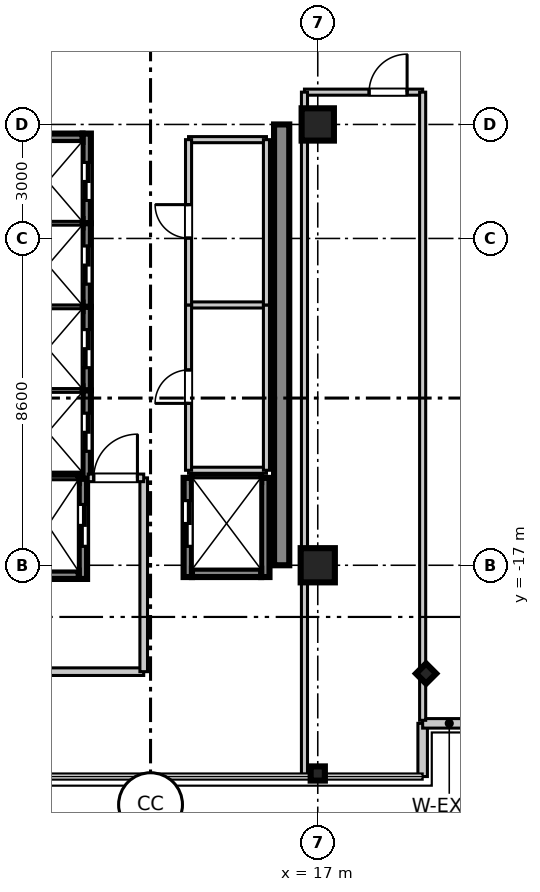
"""IFC4 building model, lengths in metres.
Left out: names, types, materials, properties, quantities, classifications, styles, units other than length and angle.
Written with IfcOpenShell. Run it as: python <this file> out.ifc"""

import sys

from ifc_helpers import new_model, si_unit, direction, frame, frame_2d, origin, origin_2d, place, context, subcontext, project, spatial, rectangle, i_section, extrude, source, transform, mapped, element, fill, save


model = new_model("IFC4")
c1 = context("Model", 3, precision=1e-05, world=origin(), true_north=direction((0.0, 1.0)))
c2 = subcontext(c1, "Body", "Model", "MODEL_VIEW")
j1 = project(units=[si_unit("LENGTHUNIT", "METRE"), si_unit("PLANEANGLEUNIT", "RADIAN")], contexts=[c1])
p1 = place(None, origin())
s1 = spatial("IfcSite", under=j1, at=p1, CompositionType="ELEMENT")
p2 = place(p1, origin())
s2 = spatial("IfcBuilding", under=s1, at=p2, CompositionType="ELEMENT")
p3 = place(p2, frame((0.0, 0.0, 334.75)))
s3 = spatial("IfcBuildingStorey", under=s2, at=p3, CompositionType="ELEMENT", Elevation=334.75)
m1 = source(origin(), c2, "Body", "SweptSolid", [
    extrude(rectangle(XDim=0.9, YDim=0.9, at=origin_2d()), origin(), (0.0, 0.0, 1.0), 3.755),
])
p4 = place(p3, frame((17.0, -17.0, 0.0), z_axis=(0.0, 0.0, 1.0), x_axis=(1.0, 0.0, 0.0)))
e1 = element("IfcColumn", 1, at=p4, inside=s3, PredefinedType="COLUMN", context=c2, shape_type="MappedRepresentation", body=[
    mapped(m1, transform((0.0, 0.0, 0.0), scale=1.0)),
])
m2 = source(origin(), c2, "Body", "SweptSolid", [
    extrude(rectangle(XDim=0.85, YDim=0.85, at=origin_2d()), origin(), (0.0, 0.0, 1.0), 3.755),
])
p5 = place(p3, frame((17.0, -5.4, 0.0), z_axis=(0.0, 0.0, 1.0), x_axis=(1.0, 0.0, 0.0)))
e2 = element("IfcColumn", 2, at=p5, inside=s3, PredefinedType="PILASTER", context=c2, shape_type="MappedRepresentation", body=[
    mapped(m2, transform((0.0, 0.0, 0.0), scale=1.0)),
])
m3 = source(origin(), c2, "Body", "SweptSolid", [
    extrude(i_section(OverallWidth=0.374, OverallDepth=0.374, WebThickness=0.014, FlangeThickness=0.023, at=origin_2d()), origin(), (0.0, 0.0, 1.0), 3.755),
])
for number, where, z_axis, x_axis in (
    (3, (17.0, -22.48, 0.0), (0.0, 0.0, 1.0), (0.0, 1.0, 0.0)),
    (4, (19.85, -19.85, 0.0), (0.0, 0.0, 1.0), (0.707, 0.707, 0.0)),
):
    element("IfcColumn", number, at=place(p3, frame(where, z_axis=z_axis, x_axis=x_axis)), inside=s3, PredefinedType="COLUMN", context=c2, shape_type="MappedRepresentation", body=[
        mapped(m3, transform((0.0, 0.0, 0.0), scale=1.0)),
    ])
m4 = source(origin(), c2, "Body", "SweptSolid", [
    extrude(rectangle(XDim=11.6, YDim=0.4, at=frame_2d((5.8, 0.0))), origin(), (0.0, 0.0, 1.0), 3.47),
])
p6 = place(p3, frame((16.05, -17.0, 0.0), z_axis=(0.0, 0.0, 1.0), x_axis=(0.0, 1.0, 0.0)))
e5 = element("IfcWall", 5, at=p6, inside=s3, PredefinedType="SHEAR", context=c2, shape_type="MappedRepresentation", body=[
    mapped(m4, transform((0.0, 0.0, 0.0), scale=1.0)),
])
m5 = source(origin(), c2, "Body", "SweptSolid", [
    extrude(rectangle(XDim=2.36, YDim=0.22, at=frame_2d((1.18, 0.0))), origin(), (0.0, 0.0, 1.0), 3.47),
])
p7 = place(p3, frame((10.92, -8.0, 0.0), z_axis=(0.0, 0.0, 1.0), x_axis=(0.0, 1.0, 0.0)))
e6 = element("IfcWall", 6, at=p7, inside=s3, PredefinedType="SHEAR", context=c2, shape_type="MappedRepresentation", body=[
    mapped(m5, transform((0.0, 0.0, 0.0), scale=1.0)),
])
p8 = place(p7, frame((0.6, 0.0, 0.0)))
e7 = element("IfcOpeningElement", 7, at=p8, cuts=e6, PredefinedType="OPENING", context=c2, shape_type="SweptSolid", body=[
    extrude(rectangle(XDim=1.0, YDim=2.2, at=frame_2d((0.5, 1.1))), frame((0.0, 0.12, 0.0), z_axis=(0.0, -1.0, 0.0), x_axis=(1.0, 0.0, 0.0)), (0.0, 0.0, 1.0), 0.24),
])
m6 = source(origin(), c2, "Body", "SweptSolid", [
    extrude(rectangle(XDim=1.82, YDim=0.22, at=frame_2d((0.91, 0.0))), origin(), (0.0, 0.0, 1.0), 3.47),
])
p9 = place(p3, frame((8.99, -5.75, 0.0), z_axis=(0.0, 0.0, 1.0), x_axis=(1.0, 0.0, 0.0)))
e8 = element("IfcWall", 8, at=p9, inside=s3, PredefinedType="SHEAR", context=c2, shape_type="MappedRepresentation", body=[
    mapped(m6, transform((0.0, 0.0, 0.0), scale=1.0)),
])
m7 = source(origin(), c2, "Body", "SweptSolid", [
    extrude(rectangle(XDim=2.2, YDim=0.22, at=frame_2d((1.1, 0.0))), origin(), (0.0, 0.0, 1.0), 3.47),
])
p10 = place(p3, frame((10.92, -10.2, 0.0), z_axis=(0.0, 0.0, 1.0), x_axis=(0.0, 1.0, 0.0)))
e9 = element("IfcWall", 9, at=p10, inside=s3, PredefinedType="SHEAR", context=c2, shape_type="MappedRepresentation", body=[
    mapped(m7, transform((0.0, 0.0, 0.0), scale=1.0)),
])
p11 = place(p10, frame((0.6, 0.0, 0.0)))
e10 = element("IfcOpeningElement", 10, at=p11, cuts=e9, PredefinedType="OPENING", context=c2, shape_type="SweptSolid", body=[
    extrude(rectangle(XDim=1.0, YDim=2.2, at=frame_2d((0.5, 1.1))), frame((0.0, 0.12, 0.0), z_axis=(0.0, -1.0, 0.0), x_axis=(1.0, 0.0, 0.0)), (0.0, 0.0, 1.0), 0.24),
])
m8 = source(origin(), c2, "Body", "SweptSolid", [
    extrude(rectangle(XDim=1.82, YDim=0.22, at=frame_2d((0.91, 0.0))), origin(), (0.0, 0.0, 1.0), 3.8),
])
p12 = place(p3, frame((8.99, -8.0, 0.0), z_axis=(0.0, 0.0, 1.0), x_axis=(1.0, 0.0, 0.0)))
e11 = element("IfcWall", 11, at=p12, inside=s3, PredefinedType="SHEAR", context=c2, shape_type="MappedRepresentation", body=[
    mapped(m8, transform((0.0, 0.0, 0.0), scale=1.0)),
])
p13 = place(p3, frame((10.92, -12.4, 0.0), z_axis=(0.0, 0.0, 1.0), x_axis=(0.0, 1.0, 0.0)))
e12 = element("IfcWall", 12, at=p13, inside=s3, PredefinedType="SHEAR", context=c2, shape_type="MappedRepresentation", body=[
    mapped(m7, transform((0.0, 0.0, 0.0), scale=1.0)),
])
p14 = place(p13, frame((0.6, 0.0, 0.0)))
e13 = element("IfcOpeningElement", 13, at=p14, cuts=e12, PredefinedType="OPENING", context=c2, shape_type="SweptSolid", body=[
    extrude(rectangle(XDim=1.0, YDim=2.2, at=frame_2d((0.5, 1.1))), frame((0.0, 0.12, 0.0), z_axis=(0.0, -1.0, 0.0), x_axis=(1.0, 0.0, 0.0)), (0.0, 0.0, 1.0), 0.24),
])
p15 = place(p3, frame((8.99, -10.2, 0.0), z_axis=(0.0, 0.0, 1.0), x_axis=(1.0, 0.0, 0.0)))
e14 = element("IfcWall", 14, at=p15, inside=s3, PredefinedType="SHEAR", context=c2, shape_type="MappedRepresentation", body=[
    mapped(m8, transform((0.0, 0.0, 0.0), scale=1.0)),
])
m9 = source(origin(), c2, "Body", "SweptSolid", [
    extrude(rectangle(XDim=2.325, YDim=0.22, at=frame_2d((1.163, 0.0))), origin(), (0.0, 0.0, 1.0), 3.47),
])
p16 = place(p3, frame((10.92, -14.725, 0.0), z_axis=(0.0, 0.0, 1.0), x_axis=(0.0, 1.0, 0.0)))
e15 = element("IfcWall", 15, at=p16, inside=s3, PredefinedType="SHEAR", context=c2, shape_type="MappedRepresentation", body=[
    mapped(m9, transform((0.0, 0.0, 0.0), scale=1.0)),
])
p17 = place(p16, frame((0.725, 0.0, 0.0)))
e16 = element("IfcOpeningElement", 16, at=p17, cuts=e15, PredefinedType="OPENING", context=c2, shape_type="SweptSolid", body=[
    extrude(rectangle(XDim=1.0, YDim=2.2, at=frame_2d((0.5, 1.1))), frame((0.0, 0.12, 0.0), z_axis=(0.0, -1.0, 0.0), x_axis=(1.0, 0.0, 0.0)), (0.0, 0.0, 1.0), 0.24),
])
p18 = place(p3, frame((8.99, -12.4, 0.0), z_axis=(0.0, 0.0, 1.0), x_axis=(1.0, 0.0, 0.0)))
e17 = element("IfcWall", 17, at=p18, inside=s3, PredefinedType="SHEAR", context=c2, shape_type="MappedRepresentation", body=[
    mapped(m8, transform((0.0, 0.0, 0.0), scale=1.0)),
])
m10 = source(origin(), c2, "Body", "SweptSolid", [
    extrude(rectangle(XDim=2.635, YDim=0.22, at=frame_2d((1.317, 0.0))), origin(), (0.0, 0.0, 1.0), 3.47),
])
p19 = place(p3, frame((10.82, -17.36, 0.0), z_axis=(0.0, 0.0, 1.0), x_axis=(0.0, 1.0, 0.0)))
e18 = element("IfcWall", 18, at=p19, inside=s3, PredefinedType="SHEAR", context=c2, shape_type="MappedRepresentation", body=[
    mapped(m10, transform((0.0, 0.0, 0.0), scale=1.0)),
])
p20 = place(p19, frame((0.86, 0.0, 0.0)))
e19 = element("IfcOpeningElement", 19, at=p20, cuts=e18, PredefinedType="OPENING", context=c2, shape_type="SweptSolid", body=[
    extrude(rectangle(XDim=1.1, YDim=2.2, at=frame_2d((0.55, 1.1))), frame((0.0, 0.12, 0.0), z_axis=(0.0, -1.0, 0.0), x_axis=(1.0, 0.0, 0.0)), (0.0, 0.0, 1.0), 0.24),
])
m11 = source(origin(), c2, "Body", "SweptSolid", [
    extrude(rectangle(XDim=1.62, YDim=0.22, at=frame_2d((0.81, 0.0))), origin(), (0.0, 0.0, 1.0), 3.47),
])
p21 = place(p3, frame((9.09, -17.25, 0.0), z_axis=(0.0, 0.0, 1.0), x_axis=(1.0, 0.0, 0.0)))
e20 = element("IfcWall", 20, at=p21, inside=s3, PredefinedType="SHEAR", context=c2, shape_type="MappedRepresentation", body=[
    mapped(m11, transform((0.0, 0.0, 0.0), scale=1.0)),
])
m12 = source(origin(), c2, "Body", "SweptSolid", [
    extrude(rectangle(XDim=1.62, YDim=0.22, at=frame_2d((0.81, 0.0))), origin(), (0.0, 0.0, 1.0), 3.8),
])
p22 = place(p3, frame((9.09, -14.725, 0.0), z_axis=(0.0, 0.0, 1.0), x_axis=(1.0, 0.0, 0.0)))
e21 = element("IfcWall", 21, at=p22, inside=s3, PredefinedType="SHEAR", context=c2, shape_type="MappedRepresentation", body=[
    mapped(m12, transform((0.0, 0.0, 0.0), scale=1.0)),
])
m13 = source(origin(), c2, "Body", "SweptSolid", [
    extrude(rectangle(XDim=2.61, YDim=0.22, at=frame_2d((1.305, 0.0))), origin(), (0.0, 0.0, 1.0), 3.47),
])
p23 = place(p3, frame((13.58, -17.31, 0.0), z_axis=(0.0, 0.0, 1.0), x_axis=(0.0, 1.0, 0.0)))
e22 = element("IfcWall", 22, at=p23, inside=s3, PredefinedType="SHEAR", context=c2, shape_type="MappedRepresentation", body=[
    mapped(m13, transform((0.0, 0.0, 0.0), scale=1.0)),
])
p24 = place(p23, frame((0.81, 0.0, 0.0)))
e23 = element("IfcOpeningElement", 23, at=p24, cuts=e22, PredefinedType="OPENING", context=c2, shape_type="SweptSolid", body=[
    extrude(rectangle(XDim=1.2, YDim=2.2, at=frame_2d((0.6, 1.1))), frame((0.0, 0.12, 0.0), z_axis=(0.0, -1.0, 0.0), x_axis=(1.0, 0.0, 0.0)), (0.0, 0.0, 1.0), 0.24),
])
p25 = place(p3, frame((15.62, -17.31, 0.0), z_axis=(0.0, 0.0, 1.0), x_axis=(0.0, 1.0, 0.0)))
e24 = element("IfcWall", 24, at=p25, inside=s3, PredefinedType="SHEAR", context=c2, shape_type="MappedRepresentation", body=[
    mapped(m13, transform((0.0, 0.0, 0.0), scale=1.0)),
])
p26 = place(p3, frame((13.69, -17.2, 0.0), z_axis=(0.0, 0.0, 1.0), x_axis=(1.0, 0.0, 0.0)))
e25 = element("IfcWall", 25, at=p26, inside=s3, PredefinedType="SHEAR", context=c2, shape_type="MappedRepresentation", body=[
    mapped(m6, transform((0.0, 0.0, 0.0), scale=1.0)),
])
p27 = place(p3, frame((13.69, -14.7, 0.0), z_axis=(0.0, 0.0, 1.0), x_axis=(1.0, 0.0, 0.0)))
e26 = element("IfcWall", 26, at=p27, inside=s3, PredefinedType="SHEAR", context=c2, shape_type="MappedRepresentation", body=[
    mapped(m8, transform((0.0, 0.0, 0.0), scale=1.0)),
])
m14 = source(origin(), c2, "Body", "SweptSolid", [
    extrude(rectangle(XDim=1.4, YDim=0.25, at=frame_2d((0.7, 0.0))), origin(), (0.0, 0.0, 1.0), 3.47),
])
p28 = place(p3, frame((19.76, -22.56, 0.0), z_axis=(0.0, 0.0, 1.0), x_axis=(0.0, 1.0, 0.0)))
e27 = element("IfcWall", 27, at=p28, inside=s3, PredefinedType="STANDARD", context=c2, shape_type="MappedRepresentation", body=[
    mapped(m14, transform((0.0, 0.0, 0.0), scale=1.0)),
])
m15 = source(origin(), c2, "Body", "SweptSolid", [
    extrude(rectangle(XDim=1.4, YDim=0.25, at=frame_2d((0.7, 0.0))), origin(), (0.0, 0.0, 1.0), 3.47),
])
p29 = place(p3, frame((19.76, -21.16, 0.0), z_axis=(0.0, 0.0, 1.0), x_axis=(1.0, 0.0, 0.0)))
e28 = element("IfcWall", 28, at=p29, inside=s3, PredefinedType="STANDARD", context=c2, shape_type="MappedRepresentation", body=[
    mapped(m15, transform((0.0, 0.0, 0.0), scale=1.0)),
])
m16 = source(origin(), c2, "Body", "SweptSolid", [
    extrude(rectangle(XDim=5.82, YDim=0.2, at=frame_2d((2.91, 0.0))), origin(), (0.0, 0.0, 1.0), 2.81),
])
p30 = place(p3, frame((6.6, -19.8, 0.0), z_axis=(0.0, 0.0, 1.0), x_axis=(1.0, 0.0, 0.0)))
e29 = element("IfcWall", 29, at=p30, inside=s3, PredefinedType="PARTITIONING", context=c2, shape_type="MappedRepresentation", body=[
    mapped(m16, transform((0.0, 0.0, 0.0), scale=1.0)),
])
m17 = source(origin(), c2, "Body", "SweptSolid", [
    extrude(rectangle(XDim=5.1, YDim=0.2, at=frame_2d((2.55, 0.0))), origin(), (0.0, 0.0, 1.0), 2.81),
])
p31 = place(p3, frame((12.42, -19.8, 0.0), z_axis=(0.0, 0.0, 1.0), x_axis=(0.0, 1.0, 0.0)))
e30 = element("IfcWall", 30, at=p31, inside=s3, PredefinedType="PARTITIONING", context=c2, shape_type="MappedRepresentation", body=[
    mapped(m17, transform((0.0, 0.0, 0.0), scale=1.0)),
])
m18 = source(origin(), c2, "Body", "SweptSolid", [
    extrude(rectangle(XDim=1.46, YDim=0.2, at=frame_2d((0.73, 0.0))), origin(), (0.0, 0.0, 1.0), 2.81),
])
p32 = place(p3, frame((10.96, -14.7, 0.0), z_axis=(0.0, 0.0, 1.0), x_axis=(1.0, 0.0, 0.0)))
e31 = element("IfcWall", 31, at=p32, inside=s3, PredefinedType="PARTITIONING", context=c2, shape_type="MappedRepresentation", body=[
    mapped(m18, transform((0.0, 0.0, 0.0), scale=1.0)),
])
p33 = place(p32, frame((0.145, 0.0, 0.0)))
e32 = element("IfcOpeningElement", 32, at=p33, cuts=e31, PredefinedType="OPENING", context=c2, shape_type="SweptSolid", body=[
    extrude(rectangle(XDim=1.15, YDim=2.15, at=frame_2d((0.575, 1.075))), frame((0.0, 0.11, 0.0), z_axis=(0.0, -1.0, 0.0), x_axis=(1.0, 0.0, 0.0)), (0.0, 0.0, 1.0), 0.22),
])
m19 = source(origin(), c2, "Body", "SweptSolid", [
    extrude(rectangle(XDim=2.05, YDim=0.16, at=frame_2d((1.025, 0.0))), origin(), (0.0, 0.0, 1.0), 2.81),
])
for number, where, z_axis, x_axis in (
    (33, (13.6, -14.5, 0.0), (0.0, 0.0, 1.0), (1.0, 0.0, 0.0)),
    (34, (13.6, -10.15, 0.0), (0.0, 0.0, 1.0), (1.0, 0.0, 0.0)),
):
    element("IfcWall", number, at=place(p3, frame(where, z_axis=z_axis, x_axis=x_axis)), inside=s3, PredefinedType="PARTITIONING", context=c2, shape_type="MappedRepresentation", body=[
        mapped(m19, transform((0.0, 0.0, 0.0), scale=1.0)),
    ])
m20 = source(origin(), c2, "Body", "SweptSolid", [
    extrude(rectangle(XDim=4.35, YDim=0.16, at=frame_2d((2.175, 0.0))), origin(), (0.0, 0.0, 1.0), 2.81),
])
p34 = place(p3, frame((13.6, -14.5, 0.0), z_axis=(0.0, 0.0, 1.0), x_axis=(0.0, 1.0, 0.0)))
e35 = element("IfcWall", 35, at=p34, inside=s3, PredefinedType="PARTITIONING", context=c2, shape_type="MappedRepresentation", body=[
    mapped(m20, transform((0.0, 0.0, 0.0), scale=1.0)),
])
p35 = place(p34, frame((1.76, 0.0, 0.0)))
e36 = element("IfcOpeningElement", 36, at=p35, cuts=e35, PredefinedType="OPENING", context=c2, shape_type="SweptSolid", body=[
    extrude(rectangle(XDim=0.88, YDim=2.1, at=frame_2d((0.44, 1.05))), frame((0.0, 0.09, 0.0), z_axis=(0.0, -1.0, 0.0), x_axis=(1.0, 0.0, 0.0)), (0.0, 0.0, 1.0), 0.18),
])
p36 = place(p3, frame((15.65, -14.5, 0.0), z_axis=(0.0, 0.0, 1.0), x_axis=(0.0, 1.0, 0.0)))
e37 = element("IfcWall", 37, at=p36, inside=s3, PredefinedType="PARTITIONING", context=c2, shape_type="MappedRepresentation", body=[
    mapped(m20, transform((0.0, 0.0, 0.0), scale=1.0)),
])
p37 = place(p3, frame((13.6, -5.8, 0.0), z_axis=(0.0, 0.0, 1.0), x_axis=(1.0, 0.0, 0.0)))
e38 = element("IfcWall", 38, at=p37, inside=s3, PredefinedType="PARTITIONING", context=c2, shape_type="MappedRepresentation", body=[
    mapped(m19, transform((0.0, 0.0, 0.0), scale=1.0)),
])
m21 = source(origin(), c2, "Body", "SweptSolid", [
    extrude(rectangle(XDim=4.35, YDim=0.16, at=frame_2d((2.175, 0.0))), origin(), (0.0, 0.0, 1.0), 2.81),
])
p38 = place(p3, frame((13.6, -10.15, 0.0), z_axis=(0.0, 0.0, 1.0), x_axis=(0.0, 1.0, 0.0)))
e39 = element("IfcWall", 39, at=p38, inside=s3, PredefinedType="PARTITIONING", context=c2, shape_type="MappedRepresentation", body=[
    mapped(m21, transform((0.0, 0.0, 0.0), scale=1.0)),
])
p39 = place(p38, frame((1.76, 0.0, 0.0)))
e40 = element("IfcOpeningElement", 40, at=p39, cuts=e39, PredefinedType="OPENING", context=c2, shape_type="SweptSolid", body=[
    extrude(rectangle(XDim=0.88, YDim=2.1, at=frame_2d((0.44, 1.05))), frame((0.0, 0.09, 0.0), z_axis=(0.0, -1.0, 0.0), x_axis=(1.0, 0.0, 0.0)), (0.0, 0.0, 1.0), 0.18),
])
p40 = place(p3, frame((15.65, -10.15, 0.0), z_axis=(0.0, 0.0, 1.0), x_axis=(0.0, 1.0, 0.0)))
e41 = element("IfcWall", 41, at=p40, inside=s3, PredefinedType="PARTITIONING", context=c2, shape_type="MappedRepresentation", body=[
    mapped(m21, transform((0.0, 0.0, 0.0), scale=1.0)),
])
m22 = source(origin(), c2, "Body", "SweptSolid", [
    extrude(rectangle(XDim=3.11, YDim=0.16, at=frame_2d((1.555, 0.0))), origin(), (0.0, 0.0, 1.0), 2.81),
])
p41 = place(p3, frame((16.65, -4.55, 0.0), z_axis=(0.0, 0.0, 1.0), x_axis=(1.0, 0.0, 0.0)))
e42 = element("IfcWall", 42, at=p41, inside=s3, PredefinedType="PARTITIONING", context=c2, shape_type="MappedRepresentation", body=[
    mapped(m22, transform((0.0, 0.0, 0.0), scale=1.0)),
])
p42 = place(p41, frame((1.701, 0.0, 0.0)))
e43 = element("IfcOpeningElement", 43, at=p42, cuts=e42, PredefinedType="OPENING", context=c2, shape_type="SweptSolid", body=[
    extrude(rectangle(XDim=1.0, YDim=2.1, at=frame_2d((0.5, 1.05))), frame((0.0, 0.09, 0.0), z_axis=(0.0, -1.0, 0.0), x_axis=(1.0, 0.0, 0.0)), (0.0, 0.0, 1.0), 0.18),
])
m23 = source(origin(), c2, "Body", "SweptSolid", [
    extrude(rectangle(XDim=17.95, YDim=0.16, at=frame_2d((8.975, 0.0))), origin(), (0.0, 0.0, 1.0), 2.81),
])
p43 = place(p3, frame((16.65, -22.5, 0.0), z_axis=(0.0, 0.0, 1.0), x_axis=(0.0, 1.0, 0.0)))
e44 = element("IfcWall", 44, at=p43, inside=s3, PredefinedType="PARTITIONING", context=c2, shape_type="MappedRepresentation", body=[
    mapped(m23, transform((0.0, 0.0, 0.0), scale=1.0)),
])
m24 = source(origin(), c2, "Body", "SweptSolid", [
    extrude(rectangle(XDim=16.53, YDim=0.16, at=frame_2d((8.265, 0.0))), origin(), (0.0, 0.0, 1.0), 2.81),
])
p44 = place(p3, frame((19.76, -21.08, 0.0), z_axis=(0.0, 0.0, 1.0), x_axis=(0.0, 1.0, 0.0)))
e45 = element("IfcWall", 45, at=p44, inside=s3, PredefinedType="PARTITIONING", context=c2, shape_type="MappedRepresentation", body=[
    mapped(m24, transform((0.0, 0.0, 0.0), scale=1.0)),
])
m25 = source(origin(), c2, "Body", "SweptSolid", [
    extrude(rectangle(XDim=1.0, YDim=2.2, at=frame_2d((0.5, 1.1))), frame((0.0, 0.025, 0.0), z_axis=(0.0, -1.0, 0.0), x_axis=(1.0, 0.0, 0.0)), (0.0, 0.0, 1.0), 0.05),
])
p45 = place(p8, frame((1.0, 0.0, 0.0), z_axis=(0.0, 0.0, 1.0), x_axis=(-1.0, 0.0, 0.0)))
e46 = element("IfcDoor", 46, at=p45, inside=s3, OperationType="DOUBLE_DOOR_SLIDING", PredefinedType="DOOR", context=c2, shape_type="MappedRepresentation", body=[
    mapped(m25, transform((0.0, 0.0, 0.0), scale=1.0)),
])
fill(e7, e46)
p46 = place(p11, frame((1.0, 0.0, 0.0), z_axis=(0.0, 0.0, 1.0), x_axis=(-1.0, 0.0, 0.0)))
e47 = element("IfcDoor", 47, at=p46, inside=s3, OperationType="DOUBLE_DOOR_SLIDING", PredefinedType="DOOR", context=c2, shape_type="MappedRepresentation", body=[
    mapped(m25, transform((0.0, 0.0, 0.0), scale=1.0)),
])
fill(e10, e47)
p47 = place(p14, frame((1.0, 0.0, 0.0), z_axis=(0.0, 0.0, 1.0), x_axis=(-1.0, 0.0, 0.0)))
e48 = element("IfcDoor", 48, at=p47, inside=s3, OperationType="DOUBLE_DOOR_SLIDING", PredefinedType="DOOR", context=c2, shape_type="MappedRepresentation", body=[
    mapped(m25, transform((0.0, 0.0, 0.0), scale=1.0)),
])
fill(e13, e48)
p48 = place(p17, frame((1.0, 0.0, 0.0), z_axis=(0.0, 0.0, 1.0), x_axis=(-1.0, 0.0, 0.0)))
e49 = element("IfcDoor", 49, at=p48, inside=s3, OperationType="DOUBLE_DOOR_SLIDING", PredefinedType="DOOR", context=c2, shape_type="MappedRepresentation", body=[
    mapped(m25, transform((0.0, 0.0, 0.0), scale=1.0)),
])
fill(e16, e49)
m26 = source(origin(), c2, "Body", "SweptSolid", [
    extrude(rectangle(XDim=1.1, YDim=2.2, at=frame_2d((0.55, 1.1))), frame((0.0, 0.025, 0.0), z_axis=(0.0, -1.0, 0.0), x_axis=(1.0, 0.0, 0.0)), (0.0, 0.0, 1.0), 0.05),
])
p49 = place(p20, frame((1.1, 0.0, 0.0), z_axis=(0.0, 0.0, 1.0), x_axis=(-1.0, 0.0, 0.0)))
e50 = element("IfcDoor", 50, at=p49, inside=s3, OperationType="DOUBLE_DOOR_SLIDING", PredefinedType="DOOR", context=c2, shape_type="MappedRepresentation", body=[
    mapped(m26, transform((0.0, 0.0, 0.0), scale=1.0)),
])
fill(e19, e50)
m27 = source(origin(), c2, "Body", "SweptSolid", [
    extrude(rectangle(XDim=1.2, YDim=2.2, at=frame_2d((0.6, 1.1))), frame((0.0, 0.025, 0.0), z_axis=(0.0, -1.0, 0.0), x_axis=(1.0, 0.0, 0.0)), (0.0, 0.0, 1.0), 0.05),
])
p50 = place(p24, origin())
e51 = element("IfcDoor", 51, at=p50, inside=s3, OperationType="DOUBLE_DOOR_SLIDING", PredefinedType="DOOR", context=c2, shape_type="MappedRepresentation", body=[
    mapped(m27, transform((0.0, 0.0, 0.0), scale=1.0)),
])
fill(e23, e51)
m28 = source(origin(), c2, "Body", "SweptSolid", [
    extrude(rectangle(XDim=1.15, YDim=2.15, at=frame_2d((0.575, 1.075))), frame((0.0, 0.025, 0.0), z_axis=(0.0, -1.0, 0.0), x_axis=(1.0, 0.0, 0.0)), (0.0, 0.0, 1.0), 0.05),
])
p51 = place(p33, origin())
e52 = element("IfcDoor", 52, at=p51, inside=s3, OperationType="SINGLE_SWING_RIGHT", PredefinedType="DOOR", context=c2, shape_type="MappedRepresentation", body=[
    mapped(m28, transform((0.0, 0.0, 0.0), scale=1.0)),
])
fill(e32, e52)
m29 = source(origin(), c2, "Body", "SweptSolid", [
    extrude(rectangle(XDim=0.88, YDim=2.1, at=frame_2d((0.44, 1.05))), frame((0.0, 0.025, 0.0), z_axis=(0.0, -1.0, 0.0), x_axis=(1.0, 0.0, 0.0)), (0.0, 0.0, 1.0), 0.05),
])
p52 = place(p35, frame((0.88, 0.0, 0.0), z_axis=(0.0, 0.0, 1.0), x_axis=(-1.0, 0.0, 0.0)))
e53 = element("IfcDoor", 53, at=p52, inside=s3, OperationType="SINGLE_SWING_LEFT", PredefinedType="DOOR", context=c2, shape_type="MappedRepresentation", body=[
    mapped(m29, transform((0.0, 0.0, 0.0), scale=1.0)),
])
fill(e36, e53)
p53 = place(p39, frame((0.88, 0.0, 0.0), z_axis=(0.0, 0.0, 1.0), x_axis=(-1.0, 0.0, 0.0)))
e54 = element("IfcDoor", 54, at=p53, inside=s3, OperationType="SINGLE_SWING_RIGHT", PredefinedType="DOOR", context=c2, shape_type="MappedRepresentation", body=[
    mapped(m29, transform((0.0, 0.0, 0.0), scale=1.0)),
])
fill(e40, e54)
m30 = source(origin(), c2, "Body", "SweptSolid", [
    extrude(rectangle(XDim=1.0, YDim=2.1, at=frame_2d((0.5, 1.05))), frame((0.0, 0.025, 0.0), z_axis=(0.0, -1.0, 0.0), x_axis=(1.0, 0.0, 0.0)), (0.0, 0.0, 1.0), 0.05),
])
p54 = place(p42, frame((1.0, 0.0, 0.0), z_axis=(0.0, 0.0, 1.0), x_axis=(-1.0, 0.0, 0.0)))
e55 = element("IfcDoor", 55, at=p54, inside=s3, OperationType="SINGLE_SWING_RIGHT", PredefinedType="DOOR", context=c2, shape_type="MappedRepresentation", body=[
    mapped(m30, transform((0.0, 0.0, 0.0), scale=1.0)),
])
fill(e43, e55)
save(model, sys.argv[1])
